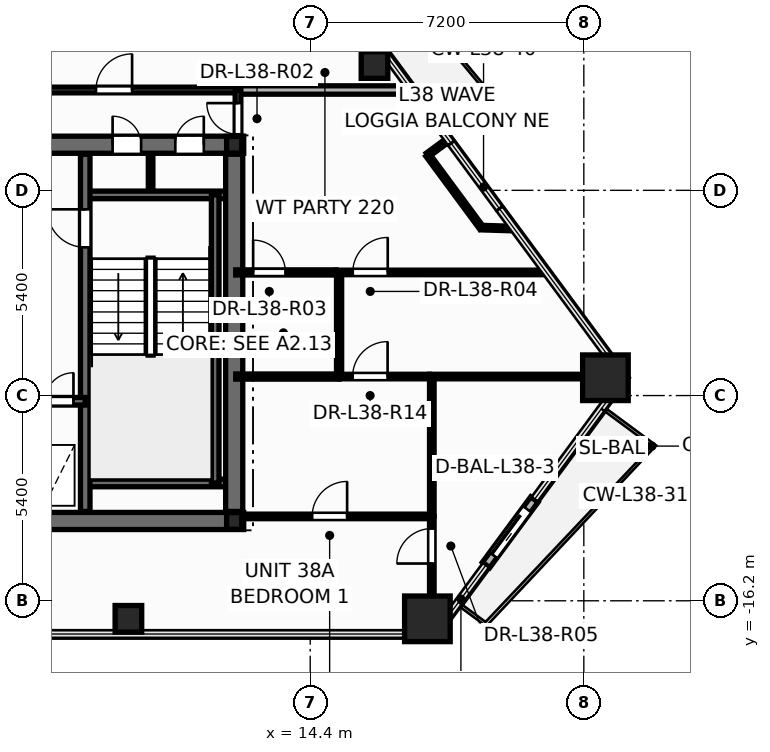
"""IFC4 building model, lengths in metres.
Left out: names, types, materials, properties, quantities, classifications, styles, units other than length and angle.
Written with IfcOpenShell. Run it as: python <this file> out.ifc"""

import sys

from ifc_helpers import new_model, si_unit, direction, frame, frame_2d, origin, origin_2d, place, context, subcontext, project, spatial, rectangle, hollow_rectangle, hollow_circle, i_section, extrude, element, fill, save


model = new_model("IFC4")
c1 = context("Model", 3, precision=1e-05, world=origin(), true_north=direction((0.0, 1.0)))
c2 = subcontext(c1, "Body", "Model", "MODEL_VIEW")
j1 = project(units=[si_unit("LENGTHUNIT", "METRE"), si_unit("PLANEANGLEUNIT", "RADIAN")], contexts=[c1])
p1 = place(None, origin())
s1 = spatial("IfcSite", under=j1, at=p1, CompositionType="ELEMENT")
p2 = place(p1, origin())
s2 = spatial("IfcBuilding", under=s1, at=p2, CompositionType="ELEMENT")
p3 = place(p2, frame((0.0, 0.0, 147.3)))
s3 = spatial("IfcBuildingStorey", under=s2, at=p3, CompositionType="ELEMENT", Elevation=147.3)
for number, where, z_axis, x_axis in (
    (1, (17.484, -16.674, 0.0), (0.0, 0.0, 1.0), (1.0, 0.0, 0.0)),
    (2, (22.168, -10.331, 0.0), (0.0, 0.0, 1.0), (1.0, 0.0, 0.0)),
):
    element("IfcColumn", number, at=place(p3, frame(where, z_axis=z_axis, x_axis=x_axis)), inside=s3, PredefinedType="COLUMN", context=c2, shape_type="SweptSolid", body=[
        extrude(hollow_rectangle(XDim=1.2, YDim=1.2, WallThickness=0.055, at=origin_2d()), origin(), (0.0, 0.0, 1.0), 3.6),
    ])
for number, where, z_axis, x_axis in (
    (3, (9.616, -16.674, 0.0), (0.0, 0.0, 1.0), (1.0, 0.0, 0.0)),
    (4, (16.092, -2.103, 0.0), (0.0, 0.0, 1.0), (1.0, 0.0, 0.0)),
):
    element("IfcColumn", number, at=place(p3, frame(where, z_axis=z_axis, x_axis=x_axis)), inside=s3, PredefinedType="COLUMN", context=c2, shape_type="SweptSolid", body=[
        extrude(hollow_circle(Radius=0.35, WallThickness=0.03, at=origin_2d()), origin(), (0.0, 0.0, 1.0), 3.6),
    ])
for number, where, z_axis, x_axis in (
    (5, (12.4, -14.1, 0.0), (0.0, 0.0, 1.0), (1.0, 0.0, 0.0)),
    (6, (12.4, -4.2, 0.0), (0.0, 0.0, 1.0), (1.0, 0.0, 0.0)),
):
    element("IfcColumn", number, at=place(p3, frame(where, z_axis=z_axis, x_axis=x_axis)), inside=s3, PredefinedType="COLUMN", context=c2, shape_type="SweptSolid", body=[
        extrude(i_section(OverallWidth=0.4, OverallDepth=0.44, WebThickness=0.028, FlangeThickness=0.04, at=origin_2d()), origin(), (0.0, 0.0, 1.0), 3.6),
    ])
p4 = place(p3, frame((19.028, -15.256, -0.015), z_axis=(0.0, 0.0, 1.0), x_axis=(0.594124797079, 0.804372877151, 0.0)))
e7 = element("IfcWall", 7, at=p4, inside=s3, PredefinedType="STANDARD", context=c2, shape_type="SweptSolid", body=[
    extrude(rectangle(XDim=2.14, YDim=0.24, at=frame_2d((1.07, 0.0))), origin(), (0.0, 0.0, 1.0), 2.807),
])
p5 = place(p4, frame((0.32, 0.0, 0.015)))
e8 = element("IfcOpeningElement", 8, at=p5, cuts=e7, PredefinedType="OPENING", context=c2, shape_type="SweptSolid", body=[
    extrude(rectangle(XDim=1.506, YDim=2.204, at=frame_2d((0.75, 1.102))), frame((0.0, 0.13, 0.0), z_axis=(0.0, -1.0, 0.0), x_axis=(1.0, 0.0, 0.0)), (0.0, 0.0, 1.0), 0.26),
])
p6 = place(p3, frame((10.2, -5.52, 0.0), z_axis=(0.0, 0.0, 1.0), x_axis=(0.0, 1.0, 0.0)))
e9 = element("IfcWall", 9, at=p6, inside=s3, PredefinedType="PARTITIONING", context=c2, shape_type="SweptSolid", body=[
    extrude(rectangle(XDim=1.12, YDim=0.12, at=frame_2d((0.56, 0.0))), origin(), (0.0, 0.0, 1.0), 3.35),
])
p7 = place(p3, frame((-12.65, -14.1, 0.0), z_axis=(0.0, 0.0, 1.0), x_axis=(1.0, 0.0, 0.0)))
e10 = element("IfcWall", 10, at=p7, inside=s3, PredefinedType="SHEAR", context=c2, shape_type="SweptSolid", body=[
    extrude(rectangle(XDim=25.3, YDim=0.45, at=frame_2d((12.65, 0.0))), origin(), (0.0, 0.0, 1.0), 3.6),
])
p8 = place(p3, frame((-12.65, -4.2, 0.0), z_axis=(0.0, 0.0, 1.0), x_axis=(1.0, 0.0, 0.0)))
e11 = element("IfcWall", 11, at=p8, inside=s3, PredefinedType="SHEAR", context=c2, shape_type="SweptSolid", body=[
    extrude(rectangle(XDim=25.3, YDim=0.45, at=frame_2d((12.65, 0.0))), origin(), (0.0, 0.0, 1.0), 3.6),
])
p9 = place(p8, frame((0.95, 0.0, 0.0)))
e12 = element("IfcOpeningElement", 12, at=p9, cuts=e11, PredefinedType="OPENING", context=c2, shape_type="SweptSolid", body=[
    extrude(rectangle(XDim=0.756, YDim=2.054, at=frame_2d((0.375, 1.027))), frame((0.0, 0.235, 0.0), z_axis=(0.0, -1.0, 0.0), x_axis=(1.0, 0.0, 0.0)), (0.0, 0.0, 1.0), 0.47),
])
p10 = place(p8, frame((2.6, 0.0, 0.0)))
e13 = element("IfcOpeningElement", 13, at=p10, cuts=e11, PredefinedType="OPENING", context=c2, shape_type="SweptSolid", body=[
    extrude(rectangle(XDim=0.756, YDim=2.054, at=frame_2d((0.375, 1.027))), frame((0.0, 0.235, 0.0), z_axis=(0.0, -1.0, 0.0), x_axis=(1.0, 0.0, 0.0)), (0.0, 0.0, 1.0), 0.47),
])
p11 = place(p8, frame((21.85, 0.0, 0.0)))
e14 = element("IfcOpeningElement", 14, at=p11, cuts=e11, PredefinedType="OPENING", context=c2, shape_type="SweptSolid", body=[
    extrude(rectangle(XDim=0.756, YDim=2.054, at=frame_2d((0.375, 1.027))), frame((0.0, 0.235, 0.0), z_axis=(0.0, -1.0, 0.0), x_axis=(1.0, 0.0, 0.0)), (0.0, 0.0, 1.0), 0.47),
])
p12 = place(p8, frame((23.5, 0.0, 0.0)))
e15 = element("IfcOpeningElement", 15, at=p12, cuts=e11, PredefinedType="OPENING", context=c2, shape_type="SweptSolid", body=[
    extrude(rectangle(XDim=0.756, YDim=2.054, at=frame_2d((0.375, 1.027))), frame((0.0, 0.235, 0.0), z_axis=(0.0, -1.0, 0.0), x_axis=(1.0, 0.0, 0.0)), (0.0, 0.0, 1.0), 0.47),
])
p13 = place(p8, frame((5.85, 0.0, 0.0)))
e16 = element("IfcOpeningElement", 16, at=p13, cuts=e11, PredefinedType="OPENING", context=c2, shape_type="SweptSolid", body=[
    extrude(rectangle(XDim=1.006, YDim=2.104, at=frame_2d((0.5, 1.052))), frame((0.0, 0.235, 0.0), z_axis=(0.0, -1.0, 0.0), x_axis=(1.0, 0.0, 0.0)), (0.0, 0.0, 1.0), 0.47),
])
p14 = place(p8, frame((10.35, 0.0, 0.0)))
e17 = element("IfcOpeningElement", 17, at=p14, cuts=e11, PredefinedType="OPENING", context=c2, shape_type="SweptSolid", body=[
    extrude(rectangle(XDim=1.406, YDim=2.154, at=frame_2d((0.7, 1.077))), frame((0.0, 0.235, 0.0), z_axis=(0.0, -1.0, 0.0), x_axis=(1.0, 0.0, 0.0)), (0.0, 0.0, 1.0), 0.47),
])
p15 = place(p8, frame((18.45, 0.0, 0.0)))
e18 = element("IfcOpeningElement", 18, at=p15, cuts=e11, PredefinedType="OPENING", context=c2, shape_type="SweptSolid", body=[
    extrude(rectangle(XDim=1.006, YDim=2.104, at=frame_2d((0.5, 1.052))), frame((0.0, 0.235, 0.0), z_axis=(0.0, -1.0, 0.0), x_axis=(1.0, 0.0, 0.0)), (0.0, 0.0, 1.0), 0.47),
])
for number, where, z_axis, x_axis in (
    (19, (8.48, -5.52, 0.0), (0.0, 0.0, 1.0), (1.0, 0.0, 0.0)),
    (20, (8.48, -13.1, 0.0), (0.0, 0.0, 1.0), (1.0, 0.0, 0.0)),
):
    element("IfcWall", number, at=place(p3, frame(where, z_axis=z_axis, x_axis=x_axis)), inside=s3, PredefinedType="SOLIDWALL", context=c2, shape_type="SweptSolid", body=[
        extrude(rectangle(XDim=3.87, YDim=0.2, at=frame_2d((1.935, 0.0))), origin(), (0.0, 0.0, 1.0), 3.6),
    ])
p16 = place(p3, frame((11.9, -13.1, 0.0), z_axis=(0.0, 0.0, 1.0), x_axis=(0.0, 1.0, 0.0)))
e21 = element("IfcWall", 21, at=p16, inside=s3, PredefinedType="SOLIDWALL", context=c2, shape_type="SweptSolid", body=[
    extrude(rectangle(XDim=7.58, YDim=0.2, at=frame_2d((3.79, 0.0))), origin(), (0.0, 0.0, 1.0), 3.6),
])
p17 = place(p3, frame((8.48, -13.85, 0.0), z_axis=(0.0, 0.0, 1.0), x_axis=(0.0, 1.0, 0.0)))
e22 = element("IfcWall", 22, at=p17, inside=s3, PredefinedType="SHEAR", context=c2, shape_type="SweptSolid", body=[
    extrude(rectangle(XDim=9.4, YDim=0.25, at=frame_2d((4.7, 0.0))), origin(), (0.0, 0.0, 1.0), 3.6),
])
p18 = place(p17, frame((6.95, 0.0, 0.0)))
e23 = element("IfcOpeningElement", 23, at=p18, cuts=e22, PredefinedType="OPENING", context=c2, shape_type="SweptSolid", body=[
    extrude(rectangle(XDim=1.006, YDim=2.104, at=frame_2d((0.5, 1.052))), frame((0.0, 0.135, 0.0), z_axis=(0.0, -1.0, 0.0), x_axis=(1.0, 0.0, 0.0)), (0.0, 0.0, 1.0), 0.27),
])
p19 = place(p3, frame((5.12, -10.95, 0.0), z_axis=(0.0, 0.0, 1.0), x_axis=(1.0, 0.0, 0.0)))
e24 = element("IfcWall", 24, at=p19, inside=s3, PredefinedType="SOLIDWALL", context=c2, shape_type="SweptSolid", body=[
    extrude(rectangle(XDim=3.36, YDim=0.2, at=frame_2d((1.68, 0.0))), origin(), (0.0, 0.0, 1.0), 3.6),
])
p20 = place(p19, frame((0.42, 0.0, 0.0)))
e25 = element("IfcOpeningElement", 25, at=p20, cuts=e24, PredefinedType="OPENING", context=c2, shape_type="SweptSolid", body=[
    extrude(rectangle(XDim=1.106, YDim=2.104, at=frame_2d((0.55, 1.052))), frame((0.0, 0.11, 0.0), z_axis=(0.0, -1.0, 0.0), x_axis=(1.0, 0.0, 0.0)), (0.0, 0.0, 1.0), 0.22),
])
p21 = place(p19, frame((2.3, 0.0, 0.0)))
e26 = element("IfcOpeningElement", 26, at=p21, cuts=e24, PredefinedType="OPENING", context=c2, shape_type="SweptSolid", body=[
    extrude(rectangle(XDim=0.756, YDim=2.054, at=frame_2d((0.375, 1.027))), frame((0.0, 0.11, 0.0), z_axis=(0.0, -1.0, 0.0), x_axis=(1.0, 0.0, 0.0)), (0.0, 0.0, 1.0), 0.22),
])
p22 = place(p3, frame((12.4, -13.85, 0.0), z_axis=(0.0, 0.0, 1.0), x_axis=(0.0, 1.0, 0.0)))
e27 = element("IfcWall", 27, at=p22, inside=s3, PredefinedType="SHEAR", context=c2, shape_type="SweptSolid", body=[
    extrude(rectangle(XDim=9.4, YDim=0.45, at=frame_2d((4.7, 0.0))), origin(), (0.0, 0.0, 1.0), 3.6),
])
p23 = place(p3, frame((5.1, -2.76, 0.0), z_axis=(0.0, 0.0, 1.0), x_axis=(1.0, 0.0, 0.0)))
e28 = element("IfcWall", 28, at=p23, inside=s3, PredefinedType="PARTITIONING", context=c2, shape_type="SweptSolid", body=[
    extrude(rectangle(XDim=7.4, YDim=0.15, at=frame_2d((3.7, 0.0))), origin(), (0.0, 0.0, 1.0), 2.325),
])
p24 = place(p23, frame((3.663, 0.0, 0.0)))
e29 = element("IfcOpeningElement", 29, at=p24, cuts=e28, PredefinedType="OPENING", context=c2, shape_type="SweptSolid", body=[
    extrude(rectangle(XDim=0.956, YDim=2.104, at=frame_2d((0.475, 1.052))), frame((0.0, 0.085, 0.0), z_axis=(0.0, -1.0, 0.0), x_axis=(1.0, 0.0, 0.0)), (0.0, 0.0, 1.0), 0.17),
])
p25 = place(p3, frame((15.08, -7.56, 0.0), z_axis=(0.0, 0.0, 1.0), x_axis=(1.0, 0.0, 0.0)))
e30 = element("IfcWall", 30, at=p25, inside=s3, PredefinedType="PARTITIONING", context=c2, shape_type="SweptSolid", body=[
    extrude(rectangle(XDim=5.539, YDim=0.12, at=frame_2d((2.77, 0.0))), origin(), (0.0, 0.0, 1.0), 2.325),
])
p26 = place(p25, frame((0.44, 0.0, 0.0)))
e31 = element("IfcOpeningElement", 31, at=p26, cuts=e30, PredefinedType="OPENING", context=c2, shape_type="SweptSolid", body=[
    extrude(rectangle(XDim=0.926, YDim=2.104, at=frame_2d((0.46, 1.052))), frame((0.0, 0.07, 0.0), z_axis=(0.0, -1.0, 0.0), x_axis=(1.0, 0.0, 0.0)), (0.0, 0.0, 1.0), 0.14),
])
p27 = place(p3, frame((12.652, -13.98, 0.0), z_axis=(0.0, 0.0, 1.0), x_axis=(1.0, 0.0, 0.0)))
e32 = element("IfcWall", 32, at=p27, inside=s3, PredefinedType="PARTITIONING", context=c2, shape_type="SweptSolid", body=[
    extrude(rectangle(XDim=4.948, YDim=0.12, at=frame_2d((2.474, 0.0))), origin(), (0.0, 0.0, 1.0), 3.35),
])
p28 = place(p27, frame((1.799, 0.0, 0.0)))
e33 = element("IfcOpeningElement", 33, at=p28, cuts=e32, PredefinedType="OPENING", context=c2, shape_type="SweptSolid", body=[
    extrude(rectangle(XDim=0.926, YDim=2.104, at=frame_2d((0.46, 1.052))), frame((0.0, 0.07, 0.0), z_axis=(0.0, -1.0, 0.0), x_axis=(1.0, 0.0, 0.0)), (0.0, 0.0, 1.0), 0.14),
])
p29 = place(p3, frame((17.54, -10.3, 0.0), z_axis=(0.0, 0.0, 1.0), x_axis=(1.0, 0.0, 0.0)))
e34 = element("IfcWall", 34, at=p29, inside=s3, PredefinedType="PARTITIONING", context=c2, shape_type="SweptSolid", body=[
    extrude(rectangle(XDim=5.103, YDim=0.12, at=frame_2d((2.551, 0.0))), origin(), (0.0, 0.0, 1.0), 2.325),
])
p30 = place(p3, frame((12.5, -2.76, 0.0), z_axis=(0.0, 0.0, 1.0), x_axis=(1.0, 0.0, 0.0)))
e35 = element("IfcWall", 35, at=p30, inside=s3, PredefinedType="PARTITIONING", context=c2, shape_type="SweptSolid", body=[
    extrude(rectangle(XDim=4.574, YDim=0.22, at=frame_2d((2.287, 0.0))), origin(), (0.0, 0.0, 1.0), 2.792),
])
p31 = place(p3, frame((17.6, -13.98, 0.0), z_axis=(0.0, 0.0, 1.0), x_axis=(0.0, 1.0, 0.0)))
e36 = element("IfcWall", 36, at=p31, inside=s3, PredefinedType="PARTITIONING", context=c2, shape_type="SweptSolid", body=[
    extrude(rectangle(XDim=3.68, YDim=0.12, at=frame_2d((1.84, 0.0))), origin(), (0.0, 0.0, 1.0), 3.35),
])
p32 = place(p3, frame((17.6, -17.074, 0.0), z_axis=(0.0, 0.0, 1.0), x_axis=(0.0, 1.0, 0.0)))
e37 = element("IfcWall", 37, at=p32, inside=s3, PredefinedType="PARTITIONING", context=c2, shape_type="SweptSolid", body=[
    extrude(rectangle(XDim=3.094, YDim=0.12, at=frame_2d((1.547, 0.0))), origin(), (0.0, 0.0, 1.0), 2.792),
])
p33 = place(p32, frame((1.855, 0.0, 0.0)))
e38 = element("IfcOpeningElement", 38, at=p33, cuts=e37, PredefinedType="OPENING", context=c2, shape_type="SweptSolid", body=[
    extrude(rectangle(XDim=0.926, YDim=2.104, at=frame_2d((0.46, 1.052))), frame((0.0, 0.07, 0.0), z_axis=(0.0, -1.0, 0.0), x_axis=(1.0, 0.0, 0.0)), (0.0, 0.0, 1.0), 0.14),
])
p34 = place(p3, frame((12.44, -7.56, 0.0), z_axis=(0.0, 0.0, 1.0), x_axis=(1.0, 0.0, 0.0)))
e39 = element("IfcWall", 39, at=p34, inside=s3, PredefinedType="PARTITIONING", context=c2, shape_type="SweptSolid", body=[
    extrude(rectangle(XDim=2.638, YDim=0.135, at=frame_2d((1.319, 0.0))), origin(), (0.0, 0.0, 1.0), 2.792),
])
p35 = place(p34, frame((0.458, 0.0, 0.0)))
e40 = element("IfcOpeningElement", 40, at=p35, cuts=e39, PredefinedType="OPENING", context=c2, shape_type="SweptSolid", body=[
    extrude(rectangle(XDim=0.856, YDim=2.104, at=frame_2d((0.425, 1.052))), frame((0.0, 0.078, 0.0), z_axis=(0.0, -1.0, 0.0), x_axis=(1.0, 0.0, 0.0)), (0.0, 0.0, 1.0), 0.155),
])
p36 = place(p3, frame((15.16, -10.3, 0.0), z_axis=(0.0, 0.0, 1.0), x_axis=(0.0, 1.0, 0.0)))
e41 = element("IfcWall", 41, at=p36, inside=s3, PredefinedType="PARTITIONING", context=c2, shape_type="SweptSolid", body=[
    extrude(rectangle(XDim=2.74, YDim=0.135, at=frame_2d((1.37, 0.0))), origin(), (0.0, 0.0, 1.0), 3.35),
])
p37 = place(p3, frame((12.44, -10.3, 0.0), z_axis=(0.0, 0.0, 1.0), x_axis=(1.0, 0.0, 0.0)))
e42 = element("IfcWall", 42, at=p37, inside=s3, PredefinedType="PARTITIONING", context=c2, shape_type="SweptSolid", body=[
    extrude(rectangle(XDim=2.72, YDim=0.135, at=frame_2d((1.36, 0.0))), origin(), (0.0, 0.0, 1.0), 2.792),
])
p38 = place(p3, frame((15.16, -10.3, 0.0), z_axis=(0.0, 0.0, 1.0), x_axis=(1.0, 0.0, 0.0)))
e43 = element("IfcWall", 43, at=p38, inside=s3, PredefinedType="PARTITIONING", context=c2, shape_type="SweptSolid", body=[
    extrude(rectangle(XDim=2.378, YDim=0.12, at=frame_2d((1.189, 0.0))), origin(), (0.0, 0.0, 1.0), 3.35),
])
p39 = place(p38, frame((0.356, 0.0, 0.0)))
e44 = element("IfcOpeningElement", 44, at=p39, cuts=e43, PredefinedType="OPENING", context=c2, shape_type="SweptSolid", body=[
    extrude(rectangle(XDim=0.926, YDim=2.104, at=frame_2d((0.46, 1.052))), frame((0.0, 0.07, 0.0), z_axis=(0.0, -1.0, 0.0), x_axis=(1.0, 0.0, 0.0)), (0.0, 0.0, 1.0), 0.14),
])
p40 = place(p3, frame((18.903, -6.381, 0.0), z_axis=(0.0, 0.0, 1.0), x_axis=(-0.594053249338, 0.804425718728, 0.0)))
e45 = element("IfcWall", 45, at=p40, inside=s3, PredefinedType="PARTITIONING", context=c2, shape_type="SweptSolid", body=[
    extrude(rectangle(XDim=2.378, YDim=0.12, at=frame_2d((1.189, 0.0))), origin(), (0.0, 0.0, 1.0), 3.35),
])
p41 = place(p3, frame((12.5, -4.24, 0.0), z_axis=(0.0, 0.0, 1.0), x_axis=(0.0, 1.0, 0.0)))
e46 = element("IfcWall", 46, at=p41, inside=s3, PredefinedType="PARTITIONING", context=c2, shape_type="SweptSolid", body=[
    extrude(rectangle(XDim=1.48, YDim=0.15, at=frame_2d((0.74, 0.0))), origin(), (0.0, 0.0, 1.0), 2.325),
])
p42 = place(p41, frame((0.315, 0.0, 0.0)))
e47 = element("IfcOpeningElement", 47, at=p42, cuts=e46, PredefinedType="OPENING", context=c2, shape_type="SweptSolid", body=[
    extrude(rectangle(XDim=0.826, YDim=2.104, at=frame_2d((0.41, 1.052))), frame((0.0, 0.085, 0.0), z_axis=(0.0, -1.0, 0.0), x_axis=(1.0, 0.0, 0.0)), (0.0, 0.0, 1.0), 0.17),
])
p43 = place(p3, frame((19.754, -6.406, 0.0), z_axis=(0.0, 0.0, 1.0), x_axis=(-0.999556038353, 0.029794734305, 0.0)))
e48 = element("IfcWall", 48, at=p43, inside=s3, PredefinedType="PARTITIONING", context=c2, shape_type="SweptSolid", body=[
    extrude(rectangle(XDim=0.852, YDim=0.12, at=frame_2d((0.426, 0.0))), origin(), (0.0, 0.0, 1.0), 2.792),
])
p44 = place(p3, frame((17.49, -4.468, 0.0), z_axis=(0.0, 0.0, 1.0), x_axis=(0.80452433553, 0.593919686102, 0.0)))
e49 = element("IfcWall", 49, at=p44, inside=s3, PredefinedType="PARTITIONING", context=c2, shape_type="SweptSolid", body=[
    extrude(rectangle(XDim=0.67, YDim=0.12, at=frame_2d((0.335, 0.0))), origin(), (0.0, 0.0, 1.0), 2.792),
])
p45 = place(p5, origin())
e50 = element("IfcDoor", 50, at=p45, inside=s3, OperationType="SLIDING_TO_RIGHT", PredefinedType="DOOR", context=c2, shape_type="SweptSolid", body=[
    extrude(rectangle(XDim=1.5, YDim=2.2, at=frame_2d((0.75, 1.1))), frame((0.0, 0.025, 0.0), z_axis=(0.0, -1.0, 0.0), x_axis=(1.0, 0.0, 0.0)), (0.0, 0.0, 1.0), 0.05),
])
fill(e8, e50)
p46 = place(p18, origin())
e51 = element("IfcDoor", 51, at=p46, inside=s3, OperationType="SINGLE_SWING_RIGHT", PredefinedType="DOOR", context=c2, shape_type="SweptSolid", body=[
    extrude(rectangle(XDim=1.0, YDim=2.1, at=frame_2d((0.5, 1.05))), frame((0.0, 0.025, 0.0), z_axis=(0.0, -1.0, 0.0), x_axis=(1.0, 0.0, 0.0)), (0.0, 0.0, 1.0), 0.05),
])
fill(e23, e51)
p47 = place(p21, origin())
e52 = element("IfcDoor", 52, at=p47, inside=s3, OperationType="SINGLE_SWING_RIGHT", PredefinedType="DOOR", context=c2, shape_type="SweptSolid", body=[
    extrude(rectangle(XDim=0.75, YDim=2.05, at=frame_2d((0.375, 1.025))), frame((0.0, 0.025, 0.0), z_axis=(0.0, -1.0, 0.0), x_axis=(1.0, 0.0, 0.0)), (0.0, 0.0, 1.0), 0.05),
])
fill(e26, e52)
p48 = place(p11, origin())
e53 = element("IfcDoor", 53, at=p48, inside=s3, OperationType="SINGLE_SWING_LEFT", PredefinedType="DOOR", context=c2, shape_type="SweptSolid", body=[
    extrude(rectangle(XDim=0.75, YDim=2.05, at=frame_2d((0.375, 1.025))), frame((0.0, 0.025, 0.0), z_axis=(0.0, -1.0, 0.0), x_axis=(1.0, 0.0, 0.0)), (0.0, 0.0, 1.0), 0.05),
])
fill(e14, e53)
p49 = place(p12, origin())
e54 = element("IfcDoor", 54, at=p49, inside=s3, OperationType="SINGLE_SWING_RIGHT", PredefinedType="DOOR", context=c2, shape_type="SweptSolid", body=[
    extrude(rectangle(XDim=0.75, YDim=2.05, at=frame_2d((0.375, 1.025))), frame((0.0, 0.025, 0.0), z_axis=(0.0, -1.0, 0.0), x_axis=(1.0, 0.0, 0.0)), (0.0, 0.0, 1.0), 0.05),
])
fill(e15, e54)
p50 = place(p42, origin())
e55 = element("IfcDoor", 55, at=p50, inside=s3, OperationType="SINGLE_SWING_RIGHT", PredefinedType="DOOR", context=c2, shape_type="SweptSolid", body=[
    extrude(rectangle(XDim=0.82, YDim=2.1, at=frame_2d((0.41, 1.05))), frame((0.0, 0.025, 0.0), z_axis=(0.0, -1.0, 0.0), x_axis=(1.0, 0.0, 0.0)), (0.0, 0.0, 1.0), 0.05),
])
fill(e47, e55)
p51 = place(p35, origin())
e56 = element("IfcDoor", 56, at=p51, inside=s3, OperationType="SINGLE_SWING_LEFT", PredefinedType="DOOR", context=c2, shape_type="SweptSolid", body=[
    extrude(rectangle(XDim=0.85, YDim=2.1, at=frame_2d((0.425, 1.05))), frame((0.0, 0.025, 0.0), z_axis=(0.0, -1.0, 0.0), x_axis=(1.0, 0.0, 0.0)), (0.0, 0.0, 1.0), 0.05),
])
fill(e40, e56)
p52 = place(p26, origin())
e57 = element("IfcDoor", 57, at=p52, inside=s3, OperationType="SINGLE_SWING_RIGHT", PredefinedType="DOOR", context=c2, shape_type="SweptSolid", body=[
    extrude(rectangle(XDim=0.92, YDim=2.1, at=frame_2d((0.46, 1.05))), frame((0.0, 0.025, 0.0), z_axis=(0.0, -1.0, 0.0), x_axis=(1.0, 0.0, 0.0)), (0.0, 0.0, 1.0), 0.05),
])
fill(e31, e57)
p53 = place(p33, origin())
e58 = element("IfcDoor", 58, at=p53, inside=s3, OperationType="SINGLE_SWING_LEFT", PredefinedType="DOOR", context=c2, shape_type="SweptSolid", body=[
    extrude(rectangle(XDim=0.92, YDim=2.1, at=frame_2d((0.46, 1.05))), frame((0.0, 0.025, 0.0), z_axis=(0.0, -1.0, 0.0), x_axis=(1.0, 0.0, 0.0)), (0.0, 0.0, 1.0), 0.05),
])
fill(e38, e58)
p54 = place(p28, origin())
e59 = element("IfcDoor", 59, at=p54, inside=s3, OperationType="SINGLE_SWING_RIGHT", PredefinedType="DOOR", context=c2, shape_type="SweptSolid", body=[
    extrude(rectangle(XDim=0.92, YDim=2.1, at=frame_2d((0.46, 1.05))), frame((0.0, 0.025, 0.0), z_axis=(0.0, -1.0, 0.0), x_axis=(1.0, 0.0, 0.0)), (0.0, 0.0, 1.0), 0.05),
])
fill(e33, e59)
p55 = place(p24, origin())
e60 = element("IfcDoor", 60, at=p55, inside=s3, OperationType="SINGLE_SWING_RIGHT", PredefinedType="DOOR", context=c2, shape_type="SweptSolid", body=[
    extrude(rectangle(XDim=0.95, YDim=2.1, at=frame_2d((0.475, 1.05))), frame((0.0, 0.025, 0.0), z_axis=(0.0, -1.0, 0.0), x_axis=(1.0, 0.0, 0.0)), (0.0, 0.0, 1.0), 0.05),
])
fill(e29, e60)
p56 = place(p39, origin())
e61 = element("IfcDoor", 61, at=p56, inside=s3, OperationType="SINGLE_SWING_RIGHT", PredefinedType="DOOR", context=c2, shape_type="SweptSolid", body=[
    extrude(rectangle(XDim=0.92, YDim=2.1, at=frame_2d((0.46, 1.05))), frame((0.0, 0.025, 0.0), z_axis=(0.0, -1.0, 0.0), x_axis=(1.0, 0.0, 0.0)), (0.0, 0.0, 1.0), 0.05),
])
fill(e44, e61)
save(model, sys.argv[1])
